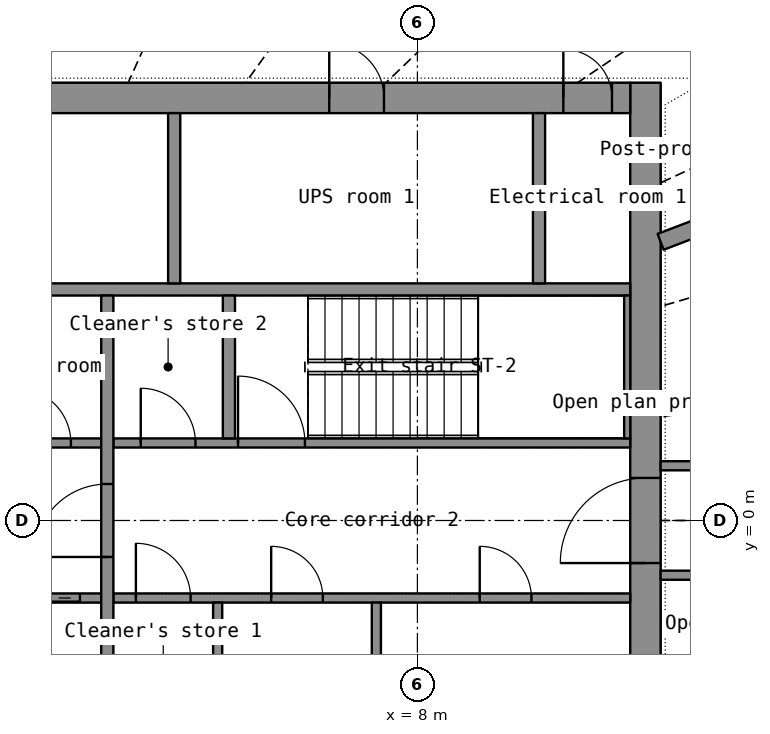
"""IFC4 building model, lengths in metres.
Left out: names, types, materials, properties, quantities, classifications, styles, units other than length and angle.
Written with IfcOpenShell. Run it as: python <this file> out.ifc"""

import sys

from ifc_helpers import new_model, si_unit, direction, frame, frame_2d, origin, place, context, subcontext, project, spatial, rectangle, extrude, element, fill, save


model = new_model("IFC4")
c1 = context("Model", 3, precision=1e-05, world=origin(), true_north=direction((0.0, 1.0)))
c2 = subcontext(c1, "Body", "Model", "MODEL_VIEW")
j1 = project(units=[si_unit("LENGTHUNIT", "METRE"), si_unit("PLANEANGLEUNIT", "RADIAN")], contexts=[c1])
p1 = place(None, origin())
s1 = spatial("IfcSite", under=j1, at=p1, CompositionType="ELEMENT")
p2 = place(p1, origin())
s2 = spatial("IfcBuilding", under=s1, at=p2, CompositionType="ELEMENT")
p3 = place(p2, frame((0.0, 0.0, 134.1)))
s3 = spatial("IfcBuildingStorey", under=s2, at=p3, CompositionType="ELEMENT", Elevation=134.1)
p4 = place(p3, frame((11.75, -7.2, 0.0), z_axis=(0.0, 0.0, 1.0), x_axis=(0.0, 1.0, 0.0)))
e1 = element("IfcWall", 1, at=p4, inside=s3, PredefinedType="SHEAR", context=c2, shape_type="SweptSolid", body=[
    extrude(rectangle(XDim=14.4, YDim=0.5, at=frame_2d((7.2, 0.0))), origin(), (0.0, 0.0, 1.0), 3.3),
])
p5 = place(p4, frame((6.5, 0.0, 0.0)))
e2 = element("IfcOpeningElement", 2, at=p5, cuts=e1, PredefinedType="OPENING", context=c2, shape_type="SweptSolid", body=[
    extrude(rectangle(XDim=1.4, YDim=2.2, at=frame_2d((0.7, 1.1))), frame((0.0, 0.26, 0.0), z_axis=(0.0, -1.0, 0.0), x_axis=(1.0, 0.0, 0.0)), (0.0, 0.0, 1.0), 0.52),
])
p6 = place(p3, frame((-11.5, 6.95, 0.0), z_axis=(0.0, 0.0, 1.0), x_axis=(1.0, 0.0, 0.0)))
e3 = element("IfcWall", 3, at=p6, inside=s3, PredefinedType="SHEAR", context=c2, shape_type="SweptSolid", body=[
    extrude(rectangle(XDim=23.0, YDim=0.5, at=frame_2d((11.5, 0.0))), origin(), (0.0, 0.0, 1.0), 3.3),
])
p7 = place(p6, frame((1.95, 0.0, 0.0)))
e4 = element("IfcOpeningElement", 4, at=p7, cuts=e3, PredefinedType="OPENING", context=c2, shape_type="SweptSolid", body=[
    extrude(rectangle(XDim=1.1, YDim=2.2, at=frame_2d((0.55, 1.1))), frame((0.0, 0.26, 0.0), z_axis=(0.0, -1.0, 0.0), x_axis=(1.0, 0.0, 0.0)), (0.0, 0.0, 1.0), 0.52),
])
p8 = place(p6, frame((10.05, 0.0, 0.0)))
e5 = element("IfcOpeningElement", 5, at=p8, cuts=e3, PredefinedType="OPENING", context=c2, shape_type="SweptSolid", body=[
    extrude(rectangle(XDim=0.9, YDim=2.1, at=frame_2d((0.45, 1.05))), frame((0.0, 0.26, 0.0), z_axis=(0.0, -1.0, 0.0), x_axis=(1.0, 0.0, 0.0)), (0.0, 0.0, 1.0), 0.52),
])
p9 = place(p6, frame((18.05, 0.0, 0.0)))
e6 = element("IfcOpeningElement", 6, at=p9, cuts=e3, PredefinedType="OPENING", context=c2, shape_type="SweptSolid", body=[
    extrude(rectangle(XDim=0.9, YDim=2.1, at=frame_2d((0.45, 1.05))), frame((0.0, 0.26, 0.0), z_axis=(0.0, -1.0, 0.0), x_axis=(1.0, 0.0, 0.0)), (0.0, 0.0, 1.0), 0.52),
])
p10 = place(p6, frame((0.3, 0.0, 0.0)))
e7 = element("IfcOpeningElement", 7, at=p10, cuts=e3, PredefinedType="OPENING", context=c2, shape_type="SweptSolid", body=[
    extrude(rectangle(XDim=0.8, YDim=2.05, at=frame_2d((0.4, 1.025))), frame((0.0, 0.26, 0.0), z_axis=(0.0, -1.0, 0.0), x_axis=(1.0, 0.0, 0.0)), (0.0, 0.0, 1.0), 0.52),
])
p11 = place(p6, frame((21.9, 0.0, 0.0)))
e8 = element("IfcOpeningElement", 8, at=p11, cuts=e3, PredefinedType="OPENING", context=c2, shape_type="SweptSolid", body=[
    extrude(rectangle(XDim=0.8, YDim=2.05, at=frame_2d((0.4, 1.025))), frame((0.0, 0.26, 0.0), z_axis=(0.0, -1.0, 0.0), x_axis=(1.0, 0.0, 0.0)), (0.0, 0.0, 1.0), 0.52),
])
p12 = place(p3, frame((-11.5, 3.8, 0.0), z_axis=(0.0, 0.0, 1.0), x_axis=(1.0, 0.0, 0.0)))
e9 = element("IfcWall", 9, at=p12, inside=s3, PredefinedType="SHEAR", context=c2, shape_type="SweptSolid", body=[
    extrude(rectangle(XDim=23.0, YDim=0.2, at=frame_2d((11.5, 0.0))), origin(), (0.0, 0.0, 1.0), 3.3),
])
p13 = place(p3, frame((10.0, 3.9, 0.0), z_axis=(0.0, 0.0, 1.0), x_axis=(0.0, 1.0, 0.0)))
e10 = element("IfcWall", 10, at=p13, inside=s3, PredefinedType="SHEAR", context=c2, shape_type="SweptSolid", body=[
    extrude(rectangle(XDim=2.8, YDim=0.2, at=frame_2d((1.4, 0.0))), origin(), (0.0, 0.0, 1.0), 3.3),
])
p14 = place(p3, frame((4.0, 3.9, 0.0), z_axis=(0.0, 0.0, 1.0), x_axis=(0.0, 1.0, 0.0)))
e11 = element("IfcWall", 11, at=p14, inside=s3, PredefinedType="PARTITIONING", context=c2, shape_type="SweptSolid", body=[
    extrude(rectangle(XDim=2.8, YDim=0.2, at=frame_2d((1.4, 0.0))), origin(), (0.0, 0.0, 1.0), 3.3),
])
p15 = place(p3, frame((-2.8, -1.275, 0.0), z_axis=(0.0, 0.0, 1.0), x_axis=(1.0, 0.0, 0.0)))
e12 = element("IfcWall", 12, at=p15, inside=s3, PredefinedType="SHEAR", context=c2, shape_type="SweptSolid", body=[
    extrude(rectangle(XDim=5.6, YDim=0.15, at=frame_2d((2.8, 0.0))), origin(), (0.0, 0.0, 1.0), 3.3),
])
p16 = place(p15, frame((4.15, 0.0, 0.0)))
e13 = element("IfcOpeningElement", 13, at=p16, cuts=e12, PredefinedType="OPENING", context=c2, shape_type="SweptSolid", body=[
    extrude(rectangle(XDim=1.1, YDim=2.2, at=frame_2d((0.55, 1.1))), frame((0.0, 0.085, 0.0), z_axis=(0.0, -1.0, 0.0), x_axis=(1.0, 0.0, 0.0)), (0.0, 0.0, 1.0), 0.17),
])
p17 = place(p15, frame((1.35, 0.0, 0.0)))
e14 = element("IfcOpeningElement", 14, at=p17, cuts=e12, PredefinedType="OPENING", context=c2, shape_type="SweptSolid", body=[
    extrude(rectangle(XDim=0.9, YDim=2.1, at=frame_2d((0.45, 1.05))), frame((0.0, 0.085, 0.0), z_axis=(0.0, -1.0, 0.0), x_axis=(1.0, 0.0, 0.0)), (0.0, 0.0, 1.0), 0.17),
])
p18 = place(p3, frame((3.0, -1.275, 0.0), z_axis=(0.0, 0.0, 1.0), x_axis=(1.0, 0.0, 0.0)))
e15 = element("IfcWall", 15, at=p18, inside=s3, PredefinedType="PARTITIONING", context=c2, shape_type="SweptSolid", body=[
    extrude(rectangle(XDim=8.5, YDim=0.15, at=frame_2d((4.25, 0.0))), origin(), (0.0, 0.0, 1.0), 3.3),
])
p19 = place(p18, frame((0.37, 0.0, 0.0)))
e16 = element("IfcOpeningElement", 16, at=p19, cuts=e15, PredefinedType="OPENING", context=c2, shape_type="SweptSolid", body=[
    extrude(rectangle(XDim=0.9, YDim=2.1, at=frame_2d((0.45, 1.05))), frame((0.0, 0.085, 0.0), z_axis=(0.0, -1.0, 0.0), x_axis=(1.0, 0.0, 0.0)), (0.0, 0.0, 1.0), 0.17),
])
p20 = place(p18, frame((2.595, 0.0, 0.0)))
e17 = element("IfcOpeningElement", 17, at=p20, cuts=e15, PredefinedType="OPENING", context=c2, shape_type="SweptSolid", body=[
    extrude(rectangle(XDim=0.85, YDim=2.1, at=frame_2d((0.425, 1.05))), frame((0.0, 0.085, 0.0), z_axis=(0.0, -1.0, 0.0), x_axis=(1.0, 0.0, 0.0)), (0.0, 0.0, 1.0), 0.17),
])
p21 = place(p18, frame((6.025, 0.0, 0.0)))
e18 = element("IfcOpeningElement", 18, at=p21, cuts=e15, PredefinedType="OPENING", context=c2, shape_type="SweptSolid", body=[
    extrude(rectangle(XDim=0.85, YDim=2.1, at=frame_2d((0.425, 1.05))), frame((0.0, 0.085, 0.0), z_axis=(0.0, -1.0, 0.0), x_axis=(1.0, 0.0, 0.0)), (0.0, 0.0, 1.0), 0.17),
])
p22 = place(p3, frame((-2.8, 1.275, 0.0), z_axis=(0.0, 0.0, 1.0), x_axis=(1.0, 0.0, 0.0)))
e19 = element("IfcWall", 19, at=p22, inside=s3, PredefinedType="SHEAR", context=c2, shape_type="SweptSolid", body=[
    extrude(rectangle(XDim=5.6, YDim=0.15, at=frame_2d((2.8, 0.0))), origin(), (0.0, 0.0, 1.0), 3.3),
])
p23 = place(p22, frame((0.35, 0.0, 0.0)))
e20 = element("IfcOpeningElement", 20, at=p23, cuts=e19, PredefinedType="OPENING", context=c2, shape_type="SweptSolid", body=[
    extrude(rectangle(XDim=1.1, YDim=2.2, at=frame_2d((0.55, 1.1))), frame((0.0, 0.085, 0.0), z_axis=(0.0, -1.0, 0.0), x_axis=(1.0, 0.0, 0.0)), (0.0, 0.0, 1.0), 0.17),
])
p24 = place(p22, frame((2.326, 0.0, 0.0)))
e21 = element("IfcOpeningElement", 21, at=p24, cuts=e19, PredefinedType="OPENING", context=c2, shape_type="SweptSolid", body=[
    extrude(rectangle(XDim=0.9, YDim=2.1, at=frame_2d((0.45, 1.05))), frame((0.0, 0.085, 0.0), z_axis=(0.0, -1.0, 0.0), x_axis=(1.0, 0.0, 0.0)), (0.0, 0.0, 1.0), 0.17),
])
p25 = place(p22, frame((4.201, 0.0, 0.0)))
e22 = element("IfcOpeningElement", 22, at=p25, cuts=e19, PredefinedType="OPENING", context=c2, shape_type="SweptSolid", body=[
    extrude(rectangle(XDim=0.9, YDim=2.1, at=frame_2d((0.45, 1.05))), frame((0.0, 0.085, 0.0), z_axis=(0.0, -1.0, 0.0), x_axis=(1.0, 0.0, 0.0)), (0.0, 0.0, 1.0), 0.17),
])
p26 = place(p3, frame((3.0, 1.275, 0.0), z_axis=(0.0, 0.0, 1.0), x_axis=(1.0, 0.0, 0.0)))
e23 = element("IfcWall", 23, at=p26, inside=s3, PredefinedType="SHEAR", context=c2, shape_type="SweptSolid", body=[
    extrude(rectangle(XDim=8.5, YDim=0.15, at=frame_2d((4.25, 0.0))), origin(), (0.0, 0.0, 1.0), 3.3),
])
p27 = place(p26, frame((2.05, 0.0, 0.0)))
e24 = element("IfcOpeningElement", 24, at=p27, cuts=e23, PredefinedType="OPENING", context=c2, shape_type="SweptSolid", body=[
    extrude(rectangle(XDim=1.1, YDim=2.15, at=frame_2d((0.55, 1.075))), frame((0.0, 0.085, 0.0), z_axis=(0.0, -1.0, 0.0), x_axis=(1.0, 0.0, 0.0)), (0.0, 0.0, 1.0), 0.17),
])
p28 = place(p26, frame((0.45, 0.0, 0.0)))
e25 = element("IfcOpeningElement", 25, at=p28, cuts=e23, PredefinedType="OPENING", context=c2, shape_type="SweptSolid", body=[
    extrude(rectangle(XDim=0.9, YDim=2.1, at=frame_2d((0.45, 1.05))), frame((0.0, 0.085, 0.0), z_axis=(0.0, -1.0, 0.0), x_axis=(1.0, 0.0, 0.0)), (0.0, 0.0, 1.0), 0.17),
])
p29 = place(p3, frame((2.9, -3.7, 0.0), z_axis=(0.0, 0.0, 1.0), x_axis=(0.0, 1.0, 0.0)))
e26 = element("IfcWall", 26, at=p29, inside=s3, PredefinedType="SHEAR", context=c2, shape_type="SweptSolid", body=[
    extrude(rectangle(XDim=7.4, YDim=0.2, at=frame_2d((3.7, 0.0))), origin(), (0.0, 0.0, 1.0), 3.3),
])
p30 = place(p29, frame((3.1, 0.0, 0.0)))
e27 = element("IfcOpeningElement", 27, at=p30, cuts=e26, PredefinedType="OPENING", context=c2, shape_type="SweptSolid", body=[
    extrude(rectangle(XDim=1.2, YDim=2.2, at=frame_2d((0.6, 1.1))), frame((0.0, 0.11, 0.0), z_axis=(0.0, -1.0, 0.0), x_axis=(1.0, 0.0, 0.0)), (0.0, 0.0, 1.0), 0.22),
])
p31 = place(p3, frame((11.45, 1.35, 0.0), z_axis=(0.0, 0.0, 1.0), x_axis=(0.0, 1.0, 0.0)))
e28 = element("IfcWall", 28, at=p31, inside=s3, PredefinedType="SHEAR", context=c2, shape_type="SweptSolid", body=[
    extrude(rectangle(XDim=2.35, YDim=0.1, at=frame_2d((1.175, 0.0))), origin(), (0.0, 0.0, 1.0), 3.3),
])
p32 = place(p3, frame((4.9, 1.35, 0.0), z_axis=(0.0, 0.0, 1.0), x_axis=(0.0, 1.0, 0.0)))
e29 = element("IfcWall", 29, at=p32, inside=s3, PredefinedType="SHEAR", context=c2, shape_type="SweptSolid", body=[
    extrude(rectangle(XDim=2.35, YDim=0.2, at=frame_2d((1.175, 0.0))), origin(), (0.0, 0.0, 1.0), 3.3),
])
for number, where, z_axis, x_axis in (
    (30, (4.715, -3.7, 0.0), (0.0, 0.0, 1.0), (0.0, 1.0, 0.0)),
    (31, (7.325, -3.7, 0.0), (0.0, 0.0, 1.0), (0.0, 1.0, 0.0)),
):
    element("IfcWall", number, at=place(p3, frame(where, z_axis=z_axis, x_axis=x_axis)), inside=s3, PredefinedType="PARTITIONING", context=c2, shape_type="SweptSolid", body=[
        extrude(rectangle(XDim=2.35, YDim=0.15, at=frame_2d((1.175, 0.0))), origin(), (0.0, 0.0, 1.0), 3.3),
    ])
p33 = place(p3, frame((15.873, 6.063, 0.0), z_axis=(0.0, 0.0, 1.0), x_axis=(-0.934170215, -0.356827703, 0.0)))
e32 = element("IfcWall", 32, at=p33, inside=s3, PredefinedType="PARTITIONING", context=c2, shape_type="SweptSolid", body=[
    extrude(rectangle(XDim=4.146, YDim=0.28, at=frame_2d((2.073, 0.0))), origin(), (0.0, 0.0, 1.0), 2.4),
])
p34 = place(p33, frame((1.323, 0.0, 1.0)))
e33 = element("IfcOpeningElement", 33, at=p34, cuts=e32, PredefinedType="OPENING", context=c2, shape_type="SweptSolid", body=[
    extrude(rectangle(XDim=1.5, YDim=1.2, at=frame_2d((0.75, 0.6))), frame((0.0, 0.15, 0.0), z_axis=(0.0, -1.0, 0.0), x_axis=(1.0, 0.0, 0.0)), (0.0, 0.0, 1.0), 0.3),
])
p35 = place(p3, frame((12.0, -0.9, 0.0), z_axis=(0.0, 0.0, 1.0), x_axis=(1.0, 0.0, 0.0)))
e34 = element("IfcWall", 34, at=p35, inside=s3, PredefinedType="PARTITIONING", context=c2, shape_type="SweptSolid", body=[
    extrude(rectangle(XDim=4.0, YDim=0.15, at=frame_2d((2.0, 0.0))), origin(), (0.0, 0.0, 1.0), 2.4),
])
p36 = place(p35, frame((1.4, 0.0, 0.0)))
e35 = element("IfcOpeningElement", 35, at=p36, cuts=e34, PredefinedType="OPENING", context=c2, shape_type="SweptSolid", body=[
    extrude(rectangle(XDim=1.2, YDim=2.2, at=frame_2d((0.6, 1.1))), frame((0.0, 0.085, 0.0), z_axis=(0.0, -1.0, 0.0), x_axis=(1.0, 0.0, 0.0)), (0.0, 0.0, 1.0), 0.17),
])
p37 = place(p3, frame((15.923, 0.9, 0.0), z_axis=(0.0, 0.0, 1.0), x_axis=(-1.0, 0.0, 0.0)))
e36 = element("IfcWall", 36, at=p37, inside=s3, PredefinedType="PARTITIONING", context=c2, shape_type="SweptSolid", body=[
    extrude(rectangle(XDim=3.923, YDim=0.15, at=frame_2d((1.961, 0.0))), origin(), (0.0, 0.0, 1.0), 2.4),
])
p38 = place(p9, origin())
e37 = element("IfcDoor", 37, at=p38, inside=s3, OperationType="SINGLE_SWING_LEFT", PredefinedType="DOOR", context=c2, shape_type="SweptSolid", body=[
    extrude(rectangle(XDim=0.9, YDim=2.1, at=frame_2d((0.45, 1.05))), frame((0.0, 0.025, 0.0), z_axis=(0.0, -1.0, 0.0), x_axis=(1.0, 0.0, 0.0)), (0.0, 0.0, 1.0), 0.05),
])
fill(e6, e37)
p39 = place(p11, origin())
e38 = element("IfcDoor", 38, at=p39, inside=s3, OperationType="SINGLE_SWING_LEFT", PredefinedType="DOOR", context=c2, shape_type="SweptSolid", body=[
    extrude(rectangle(XDim=0.8, YDim=2.05, at=frame_2d((0.4, 1.025))), frame((0.0, 0.025, 0.0), z_axis=(0.0, -1.0, 0.0), x_axis=(1.0, 0.0, 0.0)), (0.0, 0.0, 1.0), 0.05),
])
fill(e8, e38)
p40 = place(p5, origin())
e39 = element("IfcDoor", 39, at=p40, inside=s3, OperationType="DOUBLE_DOOR_SINGLE_SWING", PredefinedType="DOOR", context=c2, shape_type="SweptSolid", body=[
    extrude(rectangle(XDim=1.4, YDim=2.2, at=frame_2d((0.7, 1.1))), frame((0.0, 0.025, 0.0), z_axis=(0.0, -1.0, 0.0), x_axis=(1.0, 0.0, 0.0)), (0.0, 0.0, 1.0), 0.05),
])
fill(e2, e39)
p41 = place(p30, origin())
e40 = element("IfcDoor", 40, at=p41, inside=s3, OperationType="SINGLE_SWING_LEFT", PredefinedType="DOOR", context=c2, shape_type="SweptSolid", body=[
    extrude(rectangle(XDim=1.2, YDim=2.2, at=frame_2d((0.6, 1.1))), frame((0.0, 0.025, 0.0), z_axis=(0.0, -1.0, 0.0), x_axis=(1.0, 0.0, 0.0)), (0.0, 0.0, 1.0), 0.05),
])
fill(e27, e40)
p42 = place(p16, origin())
e41 = element("IfcDoor", 41, at=p42, inside=s3, OperationType="DOUBLE_DOOR_SLIDING", PredefinedType="DOOR", context=c2, shape_type="SweptSolid", body=[
    extrude(rectangle(XDim=1.1, YDim=2.2, at=frame_2d((0.55, 1.1))), frame((0.0, 0.025, 0.0), z_axis=(0.0, -1.0, 0.0), x_axis=(1.0, 0.0, 0.0)), (0.0, 0.0, 1.0), 0.05),
])
fill(e13, e41)
p43 = place(p27, origin())
e42 = element("IfcDoor", 42, at=p43, inside=s3, OperationType="SINGLE_SWING_LEFT", PredefinedType="DOOR", context=c2, shape_type="SweptSolid", body=[
    extrude(rectangle(XDim=1.1, YDim=2.15, at=frame_2d((0.55, 1.075))), frame((0.0, 0.025, 0.0), z_axis=(0.0, -1.0, 0.0), x_axis=(1.0, 0.0, 0.0)), (0.0, 0.0, 1.0), 0.05),
])
fill(e24, e42)
p44 = place(p19, origin())
e43 = element("IfcDoor", 43, at=p44, inside=s3, OperationType="SINGLE_SWING_LEFT", PredefinedType="DOOR", context=c2, shape_type="SweptSolid", body=[
    extrude(rectangle(XDim=0.9, YDim=2.1, at=frame_2d((0.45, 1.05))), frame((0.0, 0.025, 0.0), z_axis=(0.0, -1.0, 0.0), x_axis=(1.0, 0.0, 0.0)), (0.0, 0.0, 1.0), 0.05),
])
fill(e16, e43)
p45 = place(p20, origin())
e44 = element("IfcDoor", 44, at=p45, inside=s3, OperationType="SINGLE_SWING_LEFT", PredefinedType="DOOR", context=c2, shape_type="SweptSolid", body=[
    extrude(rectangle(XDim=0.85, YDim=2.1, at=frame_2d((0.425, 1.05))), frame((0.0, 0.025, 0.0), z_axis=(0.0, -1.0, 0.0), x_axis=(1.0, 0.0, 0.0)), (0.0, 0.0, 1.0), 0.05),
])
fill(e17, e44)
p46 = place(p21, origin())
e45 = element("IfcDoor", 45, at=p46, inside=s3, OperationType="SINGLE_SWING_LEFT", PredefinedType="DOOR", context=c2, shape_type="SweptSolid", body=[
    extrude(rectangle(XDim=0.85, YDim=2.1, at=frame_2d((0.425, 1.05))), frame((0.0, 0.025, 0.0), z_axis=(0.0, -1.0, 0.0), x_axis=(1.0, 0.0, 0.0)), (0.0, 0.0, 1.0), 0.05),
])
fill(e18, e45)
p47 = place(p25, origin())
e46 = element("IfcDoor", 46, at=p47, inside=s3, OperationType="SINGLE_SWING_LEFT", PredefinedType="DOOR", context=c2, shape_type="SweptSolid", body=[
    extrude(rectangle(XDim=0.9, YDim=2.1, at=frame_2d((0.45, 1.05))), frame((0.0, 0.025, 0.0), z_axis=(0.0, -1.0, 0.0), x_axis=(1.0, 0.0, 0.0)), (0.0, 0.0, 1.0), 0.05),
])
fill(e22, e46)
p48 = place(p28, origin())
e47 = element("IfcDoor", 47, at=p48, inside=s3, OperationType="SINGLE_SWING_LEFT", PredefinedType="DOOR", context=c2, shape_type="SweptSolid", body=[
    extrude(rectangle(XDim=0.9, YDim=2.1, at=frame_2d((0.45, 1.05))), frame((0.0, 0.025, 0.0), z_axis=(0.0, -1.0, 0.0), x_axis=(1.0, 0.0, 0.0)), (0.0, 0.0, 1.0), 0.05),
])
fill(e25, e47)
save(model, sys.argv[1])
